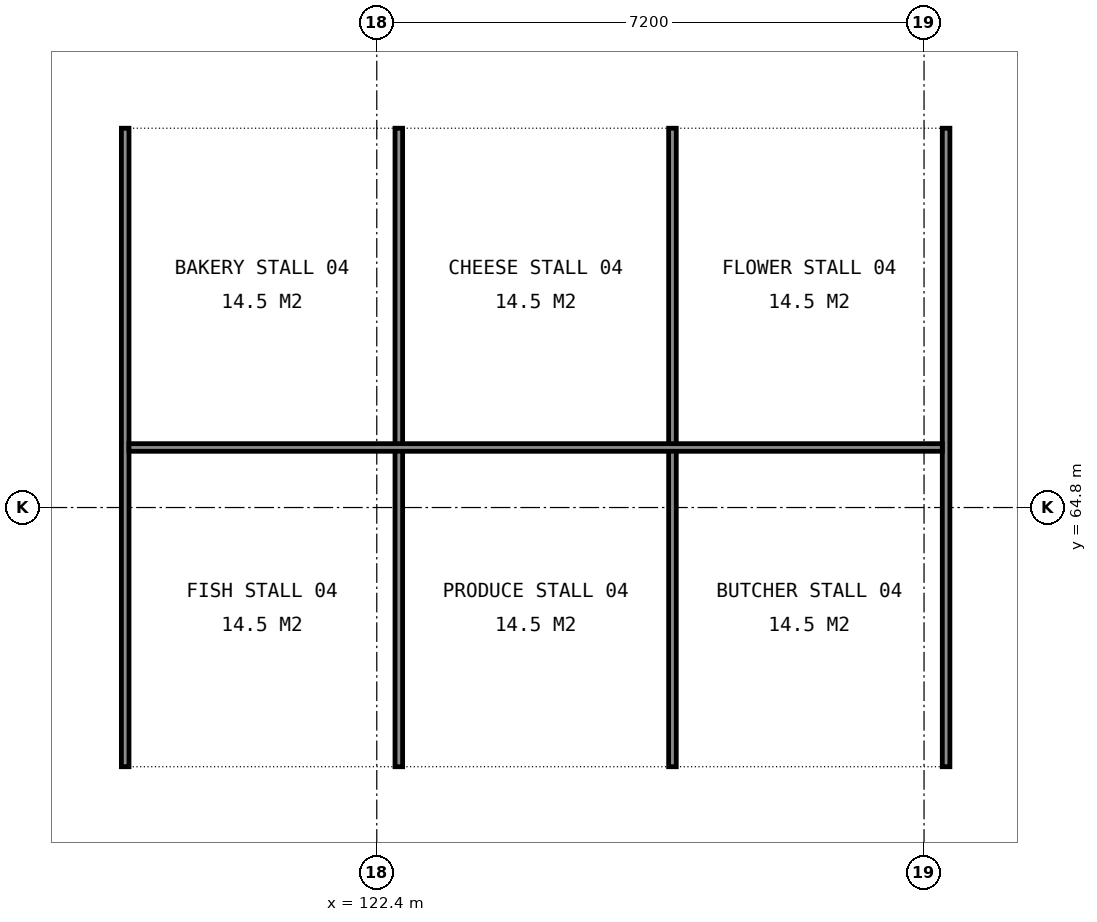
"""IFC4 building model, lengths in metres.
Left out: names, types, materials, properties, quantities, classifications, styles, units other than length and angle.
Written with IfcOpenShell. Run it as: python <this file> out.ifc"""

import sys

from ifc_helpers import new_model, si_unit, direction, frame, frame_2d, origin, place, context, subcontext, project, spatial, rectangle, extrude, element, save


model = new_model("IFC4")
c1 = context("Model", 3, precision=1e-05, world=origin(), true_north=direction((0.0, 1.0)))
c2 = subcontext(c1, "Body", "Model", "MODEL_VIEW")
j1 = project(units=[si_unit("LENGTHUNIT", "METRE"), si_unit("PLANEANGLEUNIT", "RADIAN")], contexts=[c1])
p1 = place(None, origin())
s1 = spatial("IfcSite", under=j1, at=p1, CompositionType="ELEMENT")
p2 = place(p1, origin())
s2 = spatial("IfcBuilding", under=s1, at=p2, CompositionType="ELEMENT")
p3 = place(p2, origin())
s3 = spatial("IfcBuildingStorey", under=s2, at=p3, CompositionType="ELEMENT", Elevation=0.0)
for number, where, z_axis, x_axis in (
    (1, (119.09, 61.39, 0.0), (0.0, 0.0, 1.0), (0.0, 1.0, 0.0)),
    (2, (122.69, 61.39, 0.0), (0.0, 0.0, 1.0), (0.0, 1.0, 0.0)),
    (3, (126.29, 61.39, 0.0), (0.0, 0.0, 1.0), (0.0, 1.0, 0.0)),
    (4, (129.89, 61.39, 0.0), (0.0, 0.0, 1.0), (0.0, 1.0, 0.0)),
):
    element("IfcWall", number, at=place(p3, frame(where, z_axis=z_axis, x_axis=x_axis)), inside=s3, PredefinedType="PARTITIONING", context=c2, shape_type="SweptSolid", body=[
        extrude(rectangle(XDim=8.4, YDim=0.1, at=frame_2d((4.2, 0.0))), origin(), (0.0, 0.0, 1.0), 1.2),
    ])
p4 = place(p3, frame((119.14, 65.59, 0.0), z_axis=(0.0, 0.0, 1.0), x_axis=(1.0, 0.0, 0.0)))
e5 = element("IfcWall", 5, at=p4, inside=s3, PredefinedType="PARTITIONING", context=c2, shape_type="SweptSolid", body=[
    extrude(rectangle(XDim=10.7, YDim=0.1, at=frame_2d((5.35, 0.0))), origin(), (0.0, 0.0, 1.0), 1.2),
])
save(model, sys.argv[1])
